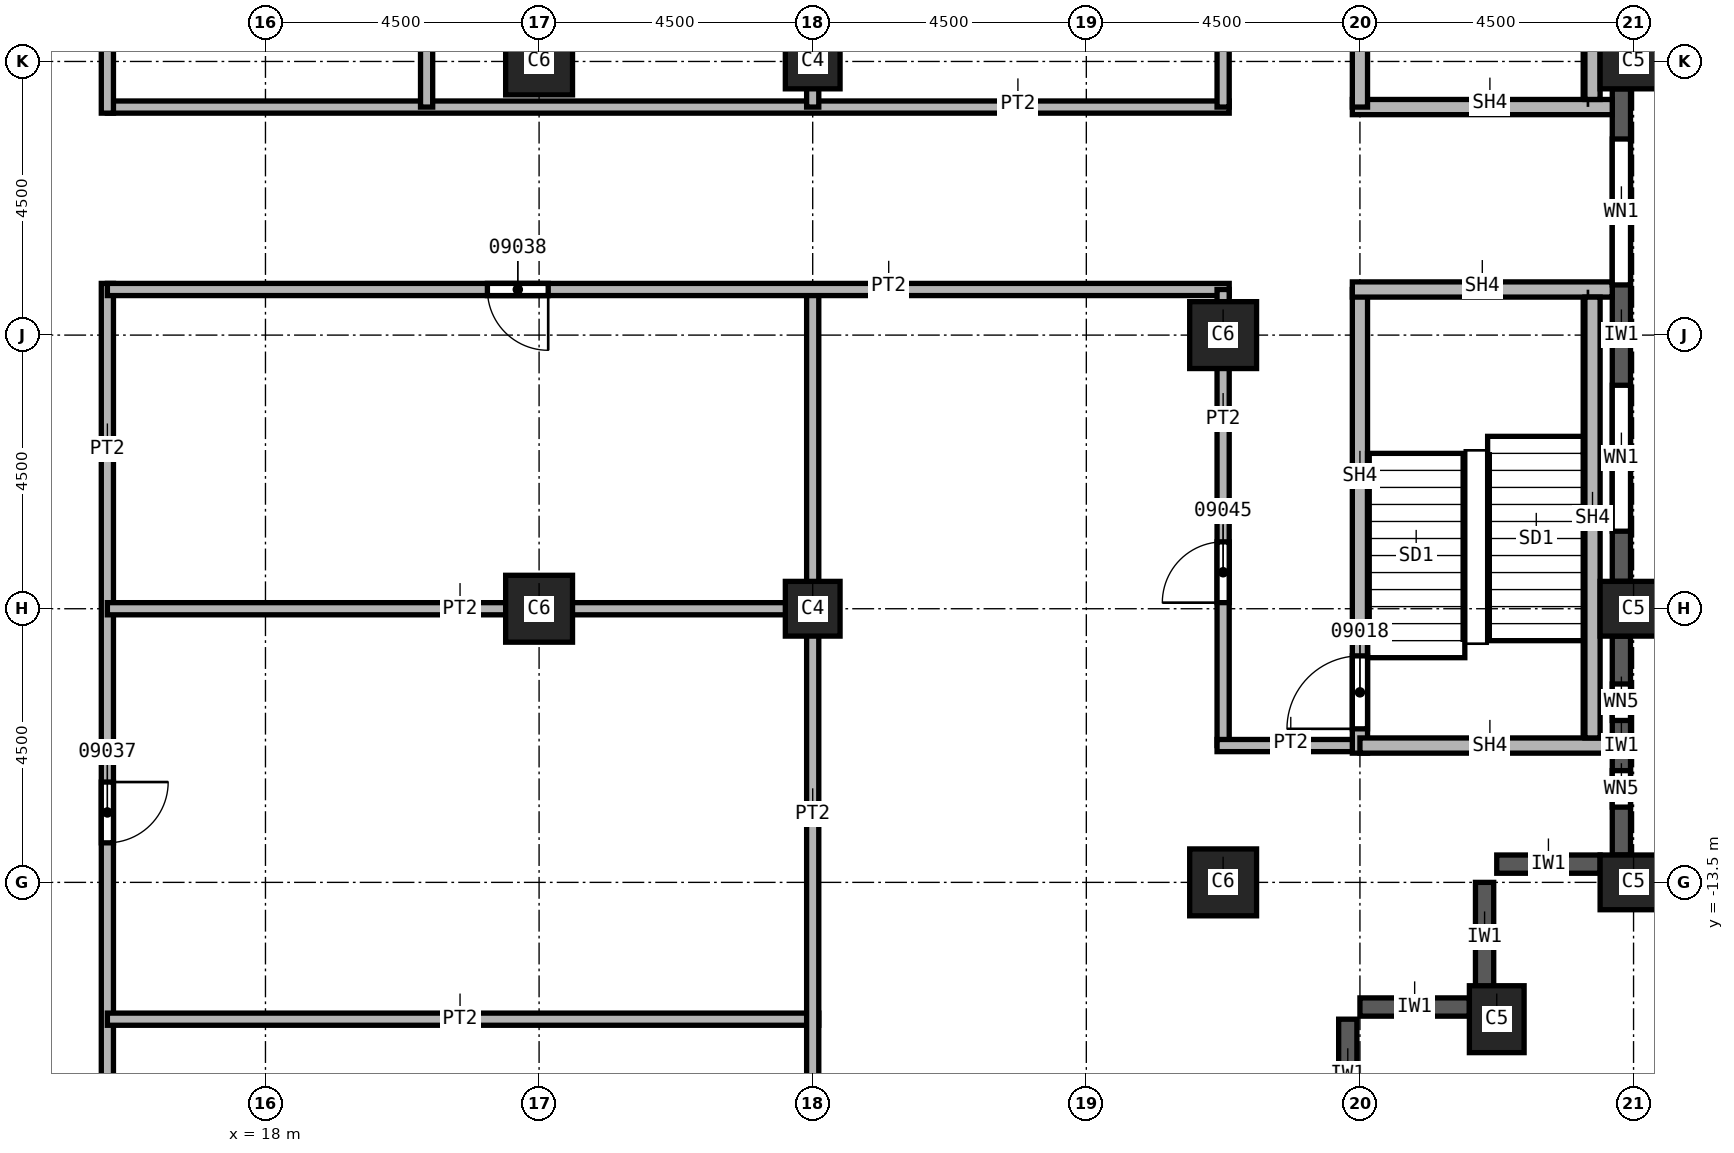
"""IFC4 building model, lengths in metres.
Left out: names, types, materials, properties, quantities, classifications, styles, units other than length and angle.
Written with IfcOpenShell. Run it as: python <this file> out.ifc"""

import sys

from ifc_helpers import new_model, si_unit, direction, frame, frame_2d, origin, origin_2d, place, context, subcontext, project, spatial, rectangle, extrude, element, fill, save


model = new_model("IFC4")
c1 = context("Model", 3, precision=1e-05, world=origin(), true_north=direction((0.0, 1.0)))
c2 = subcontext(c1, "Body", "Model", "MODEL_VIEW")
j1 = project(units=[si_unit("LENGTHUNIT", "METRE"), si_unit("PLANEANGLEUNIT", "RADIAN")], contexts=[c1])
p1 = place(None, origin())
s1 = spatial("IfcSite", under=j1, at=p1, CompositionType="ELEMENT")
p2 = place(p1, origin())
s2 = spatial("IfcBuilding", under=s1, at=p2, CompositionType="ELEMENT")
p3 = place(p2, frame((0.0, 0.0, 162.0)))
s3 = spatial("IfcBuildingStorey", under=s2, at=p3, CompositionType="ELEMENT", Elevation=162.0)
for number, where, z_axis, x_axis in (
    (1, (40.5, 0.0, 0.0), (0.0, 0.0, 1.0), (0.0, 1.0, 0.0)),
    (2, (40.5, -9.0, 0.0), (0.0, 0.0, 1.0), (0.0, 1.0, 0.0)),
    (3, (40.5, -13.5, 0.0), (0.0, 0.0, 1.0), (0.0, 1.0, 0.0)),
    (4, (38.25, -15.75, 0.0), (0.0, 0.0, 1.0), (1.0, 0.0, 0.0)),
):
    element("IfcColumn", number, at=place(p3, frame(where, z_axis=z_axis, x_axis=x_axis)), inside=s3, PredefinedType="COLUMN", context=c2, shape_type="SweptSolid", body=[
        extrude(rectangle(XDim=0.9, YDim=1.1, at=origin_2d()), origin(), (0.0, 0.0, 1.0), 3.7),
    ])
for number, where, z_axis, x_axis in (
    (5, (33.75, -4.5, 0.0), (0.0, 0.0, 1.0), (1.0, 0.0, 0.0)),
    (6, (33.75, -13.5, 0.0), (0.0, 0.0, 1.0), (1.0, 0.0, 0.0)),
    (7, (22.5, 0.0, 0.0), (0.0, 0.0, 1.0), (1.0, 0.0, 0.0)),
    (8, (22.5, -9.0, 0.0), (0.0, 0.0, 1.0), (1.0, 0.0, 0.0)),
):
    element("IfcColumn", number, at=place(p3, frame(where, z_axis=z_axis, x_axis=x_axis)), inside=s3, PredefinedType="COLUMN", context=c2, shape_type="SweptSolid", body=[
        extrude(rectangle(XDim=1.1, YDim=1.1, at=origin_2d()), origin(), (0.0, 0.0, 1.0), 3.7),
    ])
for number, where, z_axis, x_axis in (
    (9, (27.0, 0.0, 0.0), (0.0, 0.0, 1.0), (1.0, 0.0, 0.0)),
    (10, (27.0, -9.0, 0.0), (0.0, 0.0, 1.0), (1.0, 0.0, 0.0)),
):
    element("IfcColumn", number, at=place(p3, frame(where, z_axis=z_axis, x_axis=x_axis)), inside=s3, PredefinedType="COLUMN", context=c2, shape_type="SweptSolid", body=[
        extrude(rectangle(XDim=0.9, YDim=0.9, at=origin_2d()), origin(), (0.0, 0.0, 1.0), 3.7),
    ])
for number, where, z_axis, x_axis in (
    (11, (35.8, -17.55, 0.0), (0.0, 0.0, 1.0), (0.0, 1.0, 0.0)),
    (12, (37.8, -15.55, 0.0), (0.0, 0.0, 1.0), (-1.0, 0.0, 0.0)),
    (13, (38.05, -15.3, 0.0), (0.0, 0.0, 1.0), (0.0, 1.0, 0.0)),
):
    element("IfcWall", number, at=place(p3, frame(where, z_axis=z_axis, x_axis=x_axis)), inside=s3, PredefinedType="SOLIDWALL", context=c2, shape_type="SweptSolid", body=[
        extrude(rectangle(XDim=1.8, YDim=0.3, at=frame_2d((0.9, 0.0))), origin(), (0.0, 0.0, 1.0), 3.1),
    ])
p4 = place(p3, frame((39.95, -13.2, 0.0), z_axis=(0.0, 0.0, 1.0), x_axis=(-1.0, 0.0, 0.0)))
e14 = element("IfcWall", 14, at=p4, inside=s3, PredefinedType="SOLIDWALL", context=c2, shape_type="SweptSolid", body=[
    extrude(rectangle(XDim=1.7, YDim=0.3, at=frame_2d((0.85, 0.0))), origin(), (0.0, 0.0, 1.0), 3.1),
])
p5 = place(p3, frame((40.3, -13.05, 0.0), z_axis=(0.0, 0.0, 1.0), x_axis=(0.0, 1.0, 0.0)))
e15 = element("IfcWall", 15, at=p5, inside=s3, PredefinedType="SOLIDWALL", context=c2, shape_type="SweptSolid", body=[
    extrude(rectangle(XDim=3.6, YDim=0.3, at=frame_2d((1.8, 0.0))), origin(), (0.0, 0.0, 1.0), 3.1),
])
p6 = place(p5, frame((0.788, 0.0, 0.8)))
e16 = element("IfcOpeningElement", 16, at=p6, cuts=e15, PredefinedType="OPENING", context=c2, shape_type="SweptSolid", body=[
    extrude(rectangle(XDim=0.6, YDim=1.95, at=frame_2d((0.3, 0.975))), frame((0.0, 0.15, 0.0), z_axis=(0.0, -1.0, 0.0), x_axis=(1.0, 0.0, 0.0)), (0.0, 0.0, 1.0), 0.3),
])
p7 = place(p5, frame((2.212, 0.0, 0.8)))
e17 = element("IfcOpeningElement", 17, at=p7, cuts=e15, PredefinedType="OPENING", context=c2, shape_type="SweptSolid", body=[
    extrude(rectangle(XDim=0.6, YDim=1.95, at=frame_2d((0.3, 0.975))), frame((0.0, 0.15, 0.0), z_axis=(0.0, -1.0, 0.0), x_axis=(1.0, 0.0, 0.0)), (0.0, 0.0, 1.0), 0.3),
])
p8 = place(p3, frame((40.3, -8.55, 0.0), z_axis=(0.0, 0.0, 1.0), x_axis=(0.0, 1.0, 0.0)))
e18 = element("IfcWall", 18, at=p8, inside=s3, PredefinedType="SOLIDWALL", context=c2, shape_type="SweptSolid", body=[
    extrude(rectangle(XDim=8.1, YDim=0.3, at=frame_2d((4.05, 0.0))), origin(), (0.0, 0.0, 1.0), 3.1),
])
p9 = place(p8, frame((0.825, 0.0, 0.8)))
e19 = element("IfcOpeningElement", 19, at=p9, cuts=e18, PredefinedType="OPENING", context=c2, shape_type="SweptSolid", body=[
    extrude(rectangle(XDim=2.4, YDim=1.95, at=frame_2d((1.2, 0.975))), frame((0.0, 0.15, 0.0), z_axis=(0.0, -1.0, 0.0), x_axis=(1.0, 0.0, 0.0)), (0.0, 0.0, 1.0), 0.3),
])
p10 = place(p8, frame((4.875, 0.0, 0.8)))
e20 = element("IfcOpeningElement", 20, at=p10, cuts=e18, PredefinedType="OPENING", context=c2, shape_type="SweptSolid", body=[
    extrude(rectangle(XDim=2.4, YDim=1.95, at=frame_2d((1.2, 0.975))), frame((0.0, 0.15, 0.0), z_axis=(0.0, -1.0, 0.0), x_axis=(1.0, 0.0, 0.0)), (0.0, 0.0, 1.0), 0.3),
])
p11 = place(p3, frame((15.4, -3.65, 0.0), z_axis=(0.0, 0.0, 1.0), x_axis=(0.0, -1.0, 0.0)))
e21 = element("IfcWall", 21, at=p11, inside=s3, PredefinedType="PARTITIONING", context=c2, shape_type="SweptSolid", body=[
    extrude(rectangle(XDim=19.6, YDim=0.2, at=frame_2d((9.8, 0.0))), origin(), (0.0, 0.0, 1.0), 3.7),
])
p12 = place(p11, frame((18.275, 0.0, 0.0)))
e22 = element("IfcOpeningElement", 22, at=p12, cuts=e21, PredefinedType="OPENING", context=c2, shape_type="SweptSolid", body=[
    extrude(rectangle(XDim=1.0, YDim=2.1, at=frame_2d((0.5, 1.05))), frame((0.0, 0.1, 0.0), z_axis=(0.0, -1.0, 0.0), x_axis=(1.0, 0.0, 0.0)), (0.0, 0.0, 1.0), 0.2),
])
p13 = place(p11, frame((14.5, 0.0, 0.0)))
e23 = element("IfcOpeningElement", 23, at=p13, cuts=e21, PredefinedType="OPENING", context=c2, shape_type="SweptSolid", body=[
    extrude(rectangle(XDim=1.0, YDim=2.1, at=frame_2d((0.5, 1.05))), frame((0.0, 0.1, 0.0), z_axis=(0.0, -1.0, 0.0), x_axis=(1.0, 0.0, 0.0)), (0.0, 0.0, 1.0), 0.2),
])
p14 = place(p11, frame((8.2, 0.0, 0.0)))
e24 = element("IfcOpeningElement", 24, at=p14, cuts=e21, PredefinedType="OPENING", context=c2, shape_type="SweptSolid", body=[
    extrude(rectangle(XDim=1.0, YDim=2.1, at=frame_2d((0.5, 1.05))), frame((0.0, 0.1, 0.0), z_axis=(0.0, -1.0, 0.0), x_axis=(1.0, 0.0, 0.0)), (0.0, 0.0, 1.0), 0.2),
])
for number, where, z_axis, x_axis in (
    (25, (15.4, -15.75, 0.0), (0.0, 0.0, 1.0), (1.0, 0.0, 0.0)),
    (26, (15.4, -9.0, 0.0), (0.0, 0.0, 1.0), (1.0, 0.0, 0.0)),
):
    element("IfcWall", number, at=place(p3, frame(where, z_axis=z_axis, x_axis=x_axis)), inside=s3, PredefinedType="PARTITIONING", context=c2, shape_type="SweptSolid", body=[
        extrude(rectangle(XDim=11.7, YDim=0.2, at=frame_2d((5.85, 0.0))), origin(), (0.0, 0.0, 1.0), 3.7),
    ])
p15 = place(p3, frame((15.4, -0.75, 0.0), z_axis=(0.0, 0.0, 1.0), x_axis=(1.0, 0.0, 0.0)))
e27 = element("IfcWall", 27, at=p15, inside=s3, PredefinedType="PARTITIONING", context=c2, shape_type="SweptSolid", body=[
    extrude(rectangle(XDim=18.45, YDim=0.2, at=frame_2d((9.225, 0.0))), origin(), (0.0, 0.0, 1.0), 3.7),
])
p16 = place(p3, frame((15.4, 23.25, 0.0), z_axis=(0.0, 0.0, 1.0), x_axis=(0.0, -1.0, 0.0)))
e28 = element("IfcWall", 28, at=p16, inside=s3, PredefinedType="PARTITIONING", context=c2, shape_type="SweptSolid", body=[
    extrude(rectangle(XDim=24.1, YDim=0.2, at=frame_2d((12.05, 0.0))), origin(), (0.0, 0.0, 1.0), 3.7),
])
p17 = place(p16, frame((16.65, 0.0, 0.0)))
e29 = element("IfcOpeningElement", 29, at=p17, cuts=e28, PredefinedType="OPENING", context=c2, shape_type="SweptSolid", body=[
    extrude(rectangle(XDim=1.0, YDim=2.1, at=frame_2d((0.5, 1.05))), frame((0.0, 0.1, 0.0), z_axis=(0.0, -1.0, 0.0), x_axis=(1.0, 0.0, 0.0)), (0.0, 0.0, 1.0), 0.2),
])
p18 = place(p16, frame((2.8, 0.0, 0.0)))
e30 = element("IfcOpeningElement", 30, at=p18, cuts=e28, PredefinedType="OPENING", context=c2, shape_type="SweptSolid", body=[
    extrude(rectangle(XDim=1.0, YDim=2.1, at=frame_2d((0.5, 1.05))), frame((0.0, 0.1, 0.0), z_axis=(0.0, -1.0, 0.0), x_axis=(1.0, 0.0, 0.0)), (0.0, 0.0, 1.0), 0.2),
])
p19 = place(p3, frame((20.65, 23.25, 0.0), z_axis=(0.0, 0.0, 1.0), x_axis=(0.0, -1.0, 0.0)))
e31 = element("IfcWall", 31, at=p19, inside=s3, PredefinedType="PARTITIONING", context=c2, shape_type="SweptSolid", body=[
    extrude(rectangle(XDim=24.0, YDim=0.2, at=frame_2d((12.0, 0.0))), origin(), (0.0, 0.0, 1.0), 3.7),
])
p20 = place(p19, frame((15.6, 0.0, 0.0)))
e32 = element("IfcOpeningElement", 32, at=p20, cuts=e31, PredefinedType="OPENING", context=c2, shape_type="SweptSolid", body=[
    extrude(rectangle(XDim=1.0, YDim=2.1, at=frame_2d((0.5, 1.05))), frame((0.0, 0.1, 0.0), z_axis=(0.0, -1.0, 0.0), x_axis=(1.0, 0.0, 0.0)), (0.0, 0.0, 1.0), 0.2),
])
p21 = place(p19, frame((8.2, 0.0, 0.0)))
e33 = element("IfcOpeningElement", 33, at=p21, cuts=e31, PredefinedType="OPENING", context=c2, shape_type="SweptSolid", body=[
    extrude(rectangle(XDim=1.0, YDim=2.1, at=frame_2d((0.5, 1.05))), frame((0.0, 0.1, 0.0), z_axis=(0.0, -1.0, 0.0), x_axis=(1.0, 0.0, 0.0)), (0.0, 0.0, 1.0), 0.2),
])
p22 = place(p3, frame((27.0, -3.75, 0.0), z_axis=(0.0, 0.0, 1.0), x_axis=(0.0, -1.0, 0.0)))
e34 = element("IfcWall", 34, at=p22, inside=s3, PredefinedType="PARTITIONING", context=c2, shape_type="SweptSolid", body=[
    extrude(rectangle(XDim=13.7, YDim=0.2, at=frame_2d((6.85, 0.0))), origin(), (0.0, 0.0, 1.0), 3.7),
])
p23 = place(p3, frame((27.0, 17.45, 0.0), z_axis=(0.0, 0.0, 1.0), x_axis=(0.0, -1.0, 0.0)))
e35 = element("IfcWall", 35, at=p23, inside=s3, PredefinedType="PARTITIONING", context=c2, shape_type="SweptSolid", body=[
    extrude(rectangle(XDim=18.2, YDim=0.2, at=frame_2d((9.1, 0.0))), origin(), (0.0, 0.0, 1.0), 3.7),
])
p24 = place(p3, frame((33.85, -3.75, 0.0), z_axis=(0.0, 0.0, 1.0), x_axis=(-1.0, 0.0, 0.0)))
e36 = element("IfcWall", 36, at=p24, inside=s3, PredefinedType="PARTITIONING", context=c2, shape_type="SweptSolid", body=[
    extrude(rectangle(XDim=18.45, YDim=0.2, at=frame_2d((9.225, 0.0))), origin(), (0.0, 0.0, 1.0), 3.7),
])
p25 = place(p24, frame((11.2, 0.0, 0.0)))
e37 = element("IfcOpeningElement", 37, at=p25, cuts=e36, PredefinedType="OPENING", context=c2, shape_type="SweptSolid", body=[
    extrude(rectangle(XDim=1.0, YDim=2.1, at=frame_2d((0.5, 1.05))), frame((0.0, 0.1, 0.0), z_axis=(0.0, -1.0, 0.0), x_axis=(1.0, 0.0, 0.0)), (0.0, 0.0, 1.0), 0.2),
])
p26 = place(p3, frame((33.75, -11.25, 0.0), z_axis=(0.0, 0.0, 1.0), x_axis=(0.0, 1.0, 0.0)))
e38 = element("IfcWall", 38, at=p26, inside=s3, PredefinedType="PARTITIONING", context=c2, shape_type="SweptSolid", body=[
    extrude(rectangle(XDim=7.5, YDim=0.2, at=frame_2d((3.75, 0.0))), origin(), (0.0, 0.0, 1.0), 3.7),
])
p27 = place(p26, frame((2.35, 0.0, 0.0)))
e39 = element("IfcOpeningElement", 39, at=p27, cuts=e38, PredefinedType="OPENING", context=c2, shape_type="SweptSolid", body=[
    extrude(rectangle(XDim=1.0, YDim=2.1, at=frame_2d((0.5, 1.05))), frame((0.0, 0.1, 0.0), z_axis=(0.0, -1.0, 0.0), x_axis=(1.0, 0.0, 0.0)), (0.0, 0.0, 1.0), 0.2),
])
p28 = place(p3, frame((33.75, -0.75, 0.0), z_axis=(0.0, 0.0, 1.0), x_axis=(0.0, 1.0, 0.0)))
e40 = element("IfcWall", 40, at=p28, inside=s3, PredefinedType="PARTITIONING", context=c2, shape_type="SweptSolid", body=[
    extrude(rectangle(XDim=18.4, YDim=0.2, at=frame_2d((9.2, 0.0))), origin(), (0.0, 0.0, 1.0), 3.7),
])
p29 = place(p28, frame((3.4, 0.0, 0.0)))
e41 = element("IfcOpeningElement", 41, at=p29, cuts=e40, PredefinedType="OPENING", context=c2, shape_type="SweptSolid", body=[
    extrude(rectangle(XDim=1.0, YDim=2.1, at=frame_2d((0.5, 1.05))), frame((0.0, 0.1, 0.0), z_axis=(0.0, -1.0, 0.0), x_axis=(1.0, 0.0, 0.0)), (0.0, 0.0, 1.0), 0.2),
])
p30 = place(p3, frame((36.0, -11.25, 0.0), z_axis=(0.0, 0.0, 1.0), x_axis=(-1.0, 0.0, 0.0)))
e42 = element("IfcWall", 42, at=p30, inside=s3, PredefinedType="PARTITIONING", context=c2, shape_type="SweptSolid", body=[
    extrude(rectangle(XDim=2.35, YDim=0.2, at=frame_2d((1.175, 0.0))), origin(), (0.0, 0.0, 1.0), 3.7),
])
p31 = place(p3, frame((35.875, -0.75, 0.0), z_axis=(0.0, 0.0, 1.0), x_axis=(1.0, 0.0, 0.0)))
e43 = element("IfcWall", 43, at=p31, inside=s3, PredefinedType="SOLIDWALL", context=c2, shape_type="SweptSolid", body=[
    extrude(rectangle(XDim=4.275, YDim=0.25, at=frame_2d((2.137, 0.0))), origin(), (0.0, 0.0, 1.0), 3.7),
])
p32 = place(p3, frame((36.0, -11.375, 0.0), z_axis=(0.0, 0.0, 1.0), x_axis=(0.0, 1.0, 0.0)))
e44 = element("IfcWall", 44, at=p32, inside=s3, PredefinedType="SOLIDWALL", context=c2, shape_type="SweptSolid", body=[
    extrude(rectangle(XDim=7.625, YDim=0.25, at=frame_2d((3.812, 0.0))), origin(), (0.0, 0.0, 1.0), 3.7),
])
p33 = place(p32, frame((0.4, 0.0, 0.0)))
e45 = element("IfcOpeningElement", 45, at=p33, cuts=e44, PredefinedType="OPENING", context=c2, shape_type="SweptSolid", body=[
    extrude(rectangle(XDim=1.2, YDim=2.1, at=frame_2d((0.6, 1.05))), frame((0.0, 0.125, 0.0), z_axis=(0.0, -1.0, 0.0), x_axis=(1.0, 0.0, 0.0)), (0.0, 0.0, 1.0), 0.25),
])
p34 = place(p3, frame((36.0, -0.75, 0.0), z_axis=(0.0, 0.0, 1.0), x_axis=(0.0, 1.0, 0.0)))
e46 = element("IfcWall", 46, at=p34, inside=s3, PredefinedType="SOLIDWALL", context=c2, shape_type="SweptSolid", body=[
    extrude(rectangle(XDim=7.625, YDim=0.25, at=frame_2d((3.812, 0.0))), origin(), (0.0, 0.0, 1.0), 3.7),
])
p35 = place(p34, frame((5.95, 0.0, 0.0)))
e47 = element("IfcOpeningElement", 47, at=p35, cuts=e46, PredefinedType="OPENING", context=c2, shape_type="SweptSolid", body=[
    extrude(rectangle(XDim=1.2, YDim=2.1, at=frame_2d((0.6, 1.05))), frame((0.0, 0.125, 0.0), z_axis=(0.0, -1.0, 0.0), x_axis=(1.0, 0.0, 0.0)), (0.0, 0.0, 1.0), 0.25),
])
p36 = place(p3, frame((40.15, -11.25, 0.0), z_axis=(0.0, 0.0, 1.0), x_axis=(-1.0, 0.0, 0.0)))
e48 = element("IfcWall", 48, at=p36, inside=s3, PredefinedType="SOLIDWALL", context=c2, shape_type="SweptSolid", body=[
    extrude(rectangle(XDim=4.15, YDim=0.25, at=frame_2d((2.075, 0.0))), origin(), (0.0, 0.0, 1.0), 3.7),
])
p37 = place(p3, frame((40.15, -3.75, 0.0), z_axis=(0.0, 0.0, 1.0), x_axis=(-1.0, 0.0, 0.0)))
e49 = element("IfcWall", 49, at=p37, inside=s3, PredefinedType="SOLIDWALL", context=c2, shape_type="SweptSolid", body=[
    extrude(rectangle(XDim=4.275, YDim=0.25, at=frame_2d((2.137, 0.0))), origin(), (0.0, 0.0, 1.0), 3.7),
])
for number, where, z_axis, x_axis in (
    (50, (39.825, -11.125, 0.0), (0.0, 0.0, 1.0), (0.0, 1.0, 0.0)),
    (51, (39.825, -0.625, 0.0), (0.0, 0.0, 1.0), (0.0, 1.0, 0.0)),
):
    element("IfcWall", number, at=place(p3, frame(where, z_axis=z_axis, x_axis=x_axis)), inside=s3, PredefinedType="SOLIDWALL", context=c2, shape_type="SweptSolid", body=[
        extrude(rectangle(XDim=7.25, YDim=0.25, at=frame_2d((3.625, 0.0))), origin(), (0.0, 0.0, 1.0), 3.7),
    ])
p38 = place(p9, origin())
e52 = element("IfcWindow", 52, at=p38, inside=s3, PartitioningType="SINGLE_PANEL", PredefinedType="WINDOW", context=c2, shape_type="SweptSolid", body=[
    extrude(rectangle(XDim=2.4, YDim=1.95, at=frame_2d((1.2, 0.975))), frame((0.0, 0.03, 0.0), z_axis=(0.0, -1.0, 0.0), x_axis=(1.0, 0.0, 0.0)), (0.0, 0.0, 1.0), 0.06),
])
fill(e19, e52)
p39 = place(p10, origin())
e53 = element("IfcWindow", 53, at=p39, inside=s3, PartitioningType="SINGLE_PANEL", PredefinedType="WINDOW", context=c2, shape_type="SweptSolid", body=[
    extrude(rectangle(XDim=2.4, YDim=1.95, at=frame_2d((1.2, 0.975))), frame((0.0, 0.03, 0.0), z_axis=(0.0, -1.0, 0.0), x_axis=(1.0, 0.0, 0.0)), (0.0, 0.0, 1.0), 0.06),
])
fill(e20, e53)
p40 = place(p33, origin())
e54 = element("IfcDoor", 54, at=p40, inside=s3, OperationType="SINGLE_SWING_LEFT", PredefinedType="DOOR", context=c2, shape_type="SweptSolid", body=[
    extrude(rectangle(XDim=1.2, YDim=2.1, at=frame_2d((0.6, 1.05))), frame((0.0, 0.025, 0.0), z_axis=(0.0, -1.0, 0.0), x_axis=(1.0, 0.0, 0.0)), (0.0, 0.0, 1.0), 0.05),
])
fill(e45, e54)
p41 = place(p14, origin())
e55 = element("IfcDoor", 55, at=p41, inside=s3, OperationType="SINGLE_SWING_RIGHT", PredefinedType="DOOR", context=c2, shape_type="SweptSolid", body=[
    extrude(rectangle(XDim=1.0, YDim=2.1, at=frame_2d((0.5, 1.05))), frame((0.0, 0.025, 0.0), z_axis=(0.0, -1.0, 0.0), x_axis=(1.0, 0.0, 0.0)), (0.0, 0.0, 1.0), 0.05),
])
fill(e24, e55)
p42 = place(p25, origin())
e56 = element("IfcDoor", 56, at=p42, inside=s3, OperationType="SINGLE_SWING_LEFT", PredefinedType="DOOR", context=c2, shape_type="SweptSolid", body=[
    extrude(rectangle(XDim=1.0, YDim=2.1, at=frame_2d((0.5, 1.05))), frame((0.0, 0.025, 0.0), z_axis=(0.0, -1.0, 0.0), x_axis=(1.0, 0.0, 0.0)), (0.0, 0.0, 1.0), 0.05),
])
fill(e37, e56)
p43 = place(p27, origin())
e57 = element("IfcDoor", 57, at=p43, inside=s3, OperationType="SINGLE_SWING_RIGHT", PredefinedType="DOOR", context=c2, shape_type="SweptSolid", body=[
    extrude(rectangle(XDim=1.0, YDim=2.1, at=frame_2d((0.5, 1.05))), frame((0.0, 0.025, 0.0), z_axis=(0.0, -1.0, 0.0), x_axis=(1.0, 0.0, 0.0)), (0.0, 0.0, 1.0), 0.05),
])
fill(e39, e57)
p44 = place(p6, origin())
e58 = element("IfcWindow", 58, at=p44, inside=s3, PartitioningType="SINGLE_PANEL", PredefinedType="WINDOW", context=c2, shape_type="SweptSolid", body=[
    extrude(rectangle(XDim=0.6, YDim=1.95, at=frame_2d((0.3, 0.975))), frame((0.0, 0.03, 0.0), z_axis=(0.0, -1.0, 0.0), x_axis=(1.0, 0.0, 0.0)), (0.0, 0.0, 1.0), 0.06),
])
fill(e16, e58)
p45 = place(p7, origin())
e59 = element("IfcWindow", 59, at=p45, inside=s3, PartitioningType="SINGLE_PANEL", PredefinedType="WINDOW", context=c2, shape_type="SweptSolid", body=[
    extrude(rectangle(XDim=0.6, YDim=1.95, at=frame_2d((0.3, 0.975))), frame((0.0, 0.03, 0.0), z_axis=(0.0, -1.0, 0.0), x_axis=(1.0, 0.0, 0.0)), (0.0, 0.0, 1.0), 0.06),
])
fill(e17, e59)
save(model, sys.argv[1])
